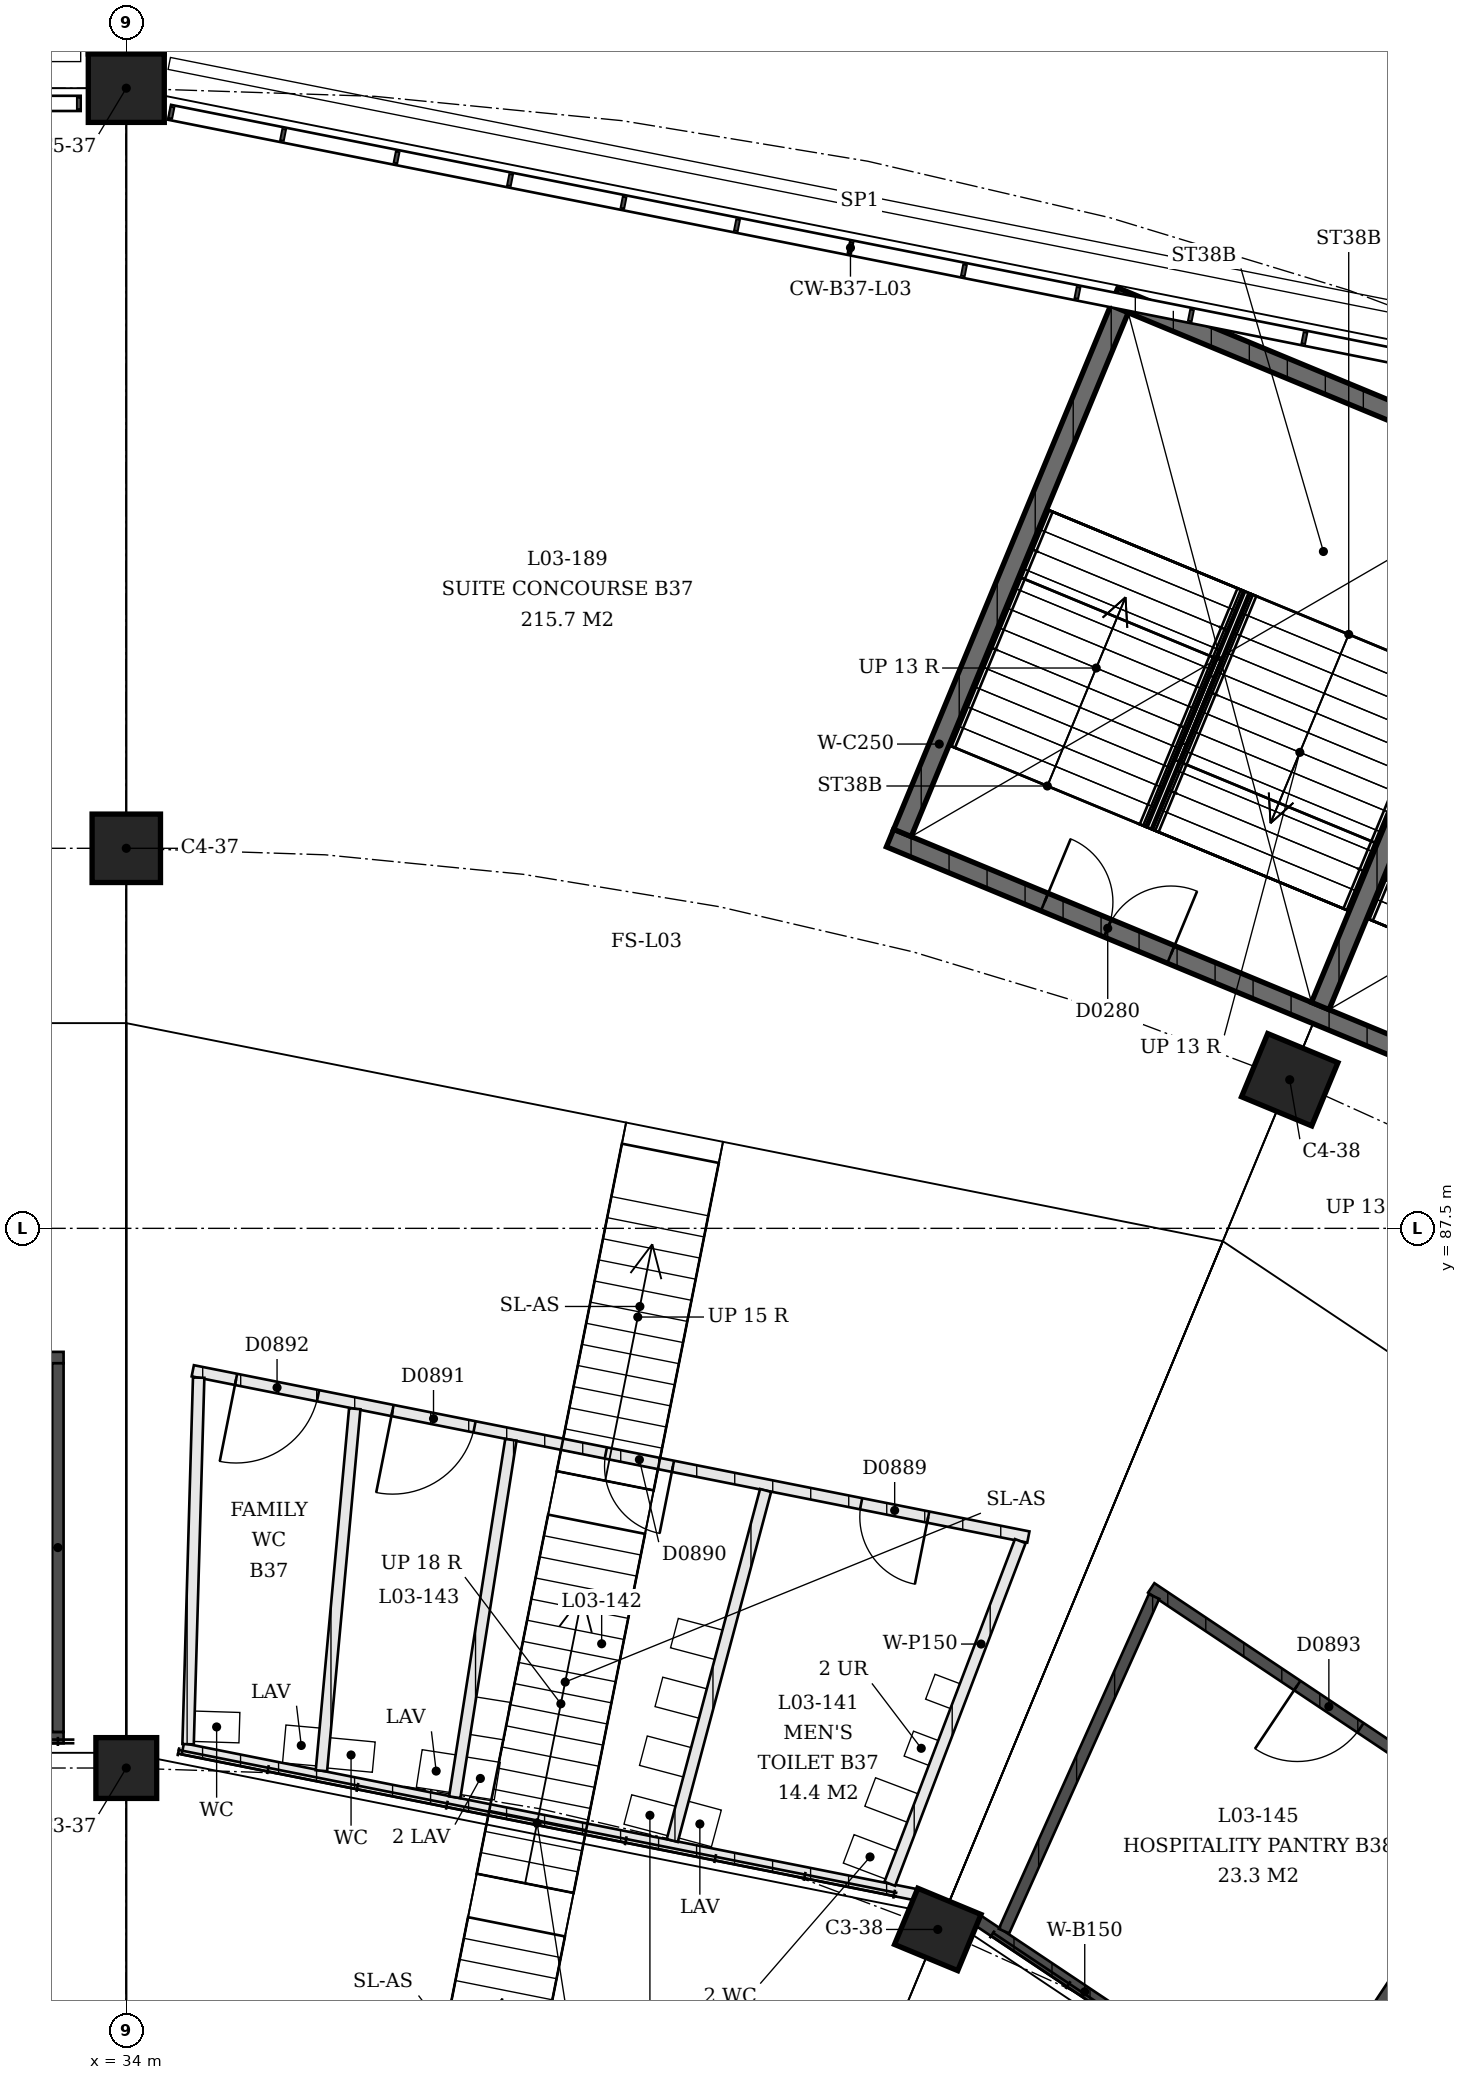
"""IFC4 building model, lengths in metres.
Left out: names, types, materials, properties, quantities, classifications, styles, units other than length and angle.
Written with IfcOpenShell. Run it as: python <this file> out.ifc"""

import sys

from ifc_helpers import new_model, si_unit, direction, frame, frame_2d, origin, origin_2d, place, context, subcontext, project, spatial, rectangle, extrude, element, fill, save


model = new_model("IFC4")
c1 = context("Model", 3, precision=1e-05, world=origin(), true_north=direction((0.0, 1.0)))
c2 = subcontext(c1, "Body", "Model", "MODEL_VIEW")
j1 = project(units=[si_unit("LENGTHUNIT", "METRE"), si_unit("PLANEANGLEUNIT", "RADIAN")], contexts=[c1])
p1 = place(None, origin())
s1 = spatial("IfcSite", under=j1, at=p1, CompositionType="ELEMENT")
p2 = place(p1, origin())
s2 = spatial("IfcBuilding", under=s1, at=p2, CompositionType="ELEMENT")
p3 = place(p2, frame((0.0, 0.0, 13.5)))
s3 = spatial("IfcBuildingStorey", under=s2, at=p3, CompositionType="ELEMENT", Elevation=13.5)
p4 = place(p3, frame((34.0, 80.4, 0.0), z_axis=(0.0, 0.0, 1.0), x_axis=(-1.0, 0.0, 0.0)))
e1 = element("IfcColumn", 1, at=p4, inside=s3, PredefinedType="COLUMN", context=c2, shape_type="SweptSolid", body=[
    extrude(rectangle(XDim=0.8, YDim=0.8, at=origin_2d()), origin(), (0.0, 0.0, 1.0), 2.033),
])
p5 = place(p3, frame((34.0, 92.5, 0.0), z_axis=(0.0, 0.0, 1.0), x_axis=(-1.0, 0.0, 0.0)))
e2 = element("IfcColumn", 2, at=p5, inside=s3, PredefinedType="COLUMN", context=c2, shape_type="SweptSolid", body=[
    extrude(rectangle(XDim=0.9, YDim=0.9, at=origin_2d()), origin(), (0.0, 0.0, 1.0), 4.5),
])
p6 = place(p3, frame((34.0, 102.5, 0.0), z_axis=(0.0, 0.0, 1.0), x_axis=(-1.0, 0.0, 0.0)))
e3 = element("IfcColumn", 3, at=p6, inside=s3, PredefinedType="COLUMN", context=c2, shape_type="SweptSolid", body=[
    extrude(rectangle(XDim=1.0, YDim=0.9, at=origin_2d()), origin(), (0.0, 0.0, 1.0), 4.5),
])
p7 = place(p3, frame((44.677, 78.276, 0.0), z_axis=(0.0, 0.0, 1.0), x_axis=(-0.923879532511, 0.382683432365, 0.0)))
e4 = element("IfcColumn", 4, at=p7, inside=s3, PredefinedType="COLUMN", context=c2, shape_type="SweptSolid", body=[
    extrude(rectangle(XDim=0.9, YDim=0.8, at=origin_2d()), origin(), (0.0, 0.0, 1.0), 2.033),
])
p8 = place(p3, frame((49.307, 89.455, 0.0), z_axis=(0.0, 0.0, 1.0), x_axis=(-0.923879532511, 0.382683432365, 0.0)))
e5 = element("IfcColumn", 5, at=p8, inside=s3, PredefinedType="COLUMN", context=c2, shape_type="SweptSolid", body=[
    extrude(rectangle(XDim=1.0, YDim=0.9, at=origin_2d()), origin(), (0.0, 0.0, 1.0), 4.5),
])
p9 = place(p3, frame((55.274, 87.985, 0.0), z_axis=(0.0, 0.0, 1.0), x_axis=(-0.923877480578, 0.382688386133, 0.0)))
e6 = element("IfcWall", 6, at=p9, inside=s3, PredefinedType="SHEAR", context=c2, shape_type="SweptSolid", body=[
    extrude(rectangle(XDim=12.15, YDim=0.25, at=frame_2d((6.075, 0.0))), origin(), (0.0, 0.0, 1.0), 4.09),
])
p10 = place(p9, frame((2.2, 0.0, 0.0)))
e7 = element("IfcOpeningElement", 7, at=p10, cuts=e6, PredefinedType="OPENING", context=c2, shape_type="SweptSolid", body=[
    extrude(rectangle(XDim=1.8, YDim=2.1, at=frame_2d((0.9, 1.05))), frame((0.0, 0.125, 0.0), z_axis=(0.0, -1.0, 0.0), x_axis=(1.0, 0.0, 0.0)), (0.0, 0.0, 1.0), 0.25),
])
p11 = place(p9, frame((8.15, 0.0, 0.0)))
e8 = element("IfcOpeningElement", 8, at=p11, cuts=e6, PredefinedType="OPENING", context=c2, shape_type="SweptSolid", body=[
    extrude(rectangle(XDim=1.8, YDim=2.1, at=frame_2d((0.9, 1.05))), frame((0.0, 0.125, 0.0), z_axis=(0.0, -1.0, 0.0), x_axis=(1.0, 0.0, 0.0)), (0.0, 0.0, 1.0), 0.25),
])
p12 = place(p3, frame((58.224, 95.108, 0.0), z_axis=(0.0, 0.0, 1.0), x_axis=(-0.923884584817, 0.382671234792, 0.0)))
e9 = element("IfcWall", 9, at=p12, inside=s3, PredefinedType="SHEAR", context=c2, shape_type="SweptSolid", body=[
    extrude(rectangle(XDim=12.15, YDim=0.25, at=frame_2d((6.075, 0.0))), origin(), (0.0, 0.0, 1.0), 4.09),
])
p13 = place(p3, frame((44.212, 92.702, 0.0), z_axis=(0.0, 0.0, 1.0), x_axis=(0.382664910245, 0.923887204407, 0.0)))
e10 = element("IfcWall", 10, at=p13, inside=s3, PredefinedType="SHEAR", context=c2, shape_type="SweptSolid", body=[
    extrude(rectangle(XDim=7.46, YDim=0.25, at=frame_2d((3.73, 0.0))), origin(), (0.0, 0.0, 1.0), 4.09),
])
p14 = place(p3, frame((49.709, 90.425, 0.0), z_axis=(0.0, 0.0, 1.0), x_axis=(0.382676480483, 0.923882412044, 0.0)))
e11 = element("IfcWall", 11, at=p14, inside=s3, PredefinedType="SHEAR", context=c2, shape_type="SweptSolid", body=[
    extrude(rectangle(XDim=7.46, YDim=0.25, at=frame_2d((3.73, 0.0))), origin(), (0.0, 0.0, 1.0), 4.09),
])
p15 = place(p3, frame((20.9, 80.8, 0.0), z_axis=(0.0, 0.0, 1.0), x_axis=(1.0, 0.0, 0.0)))
e12 = element("IfcWall", 12, at=p15, inside=s3, PredefinedType="SOLIDWALL", context=c2, shape_type="SweptSolid", body=[
    extrude(rectangle(XDim=12.275, YDim=0.15, at=frame_2d((6.138, 0.0))), origin(), (0.0, 0.0, 1.0), 3.0),
])
p16 = place(p3, frame((21.225, 85.8, 0.0), z_axis=(0.0, 0.0, 1.0), x_axis=(1.0, 0.0, 0.0)))
e13 = element("IfcWall", 13, at=p16, inside=s3, PredefinedType="SOLIDWALL", context=c2, shape_type="SweptSolid", body=[
    extrude(rectangle(XDim=11.95, YDim=0.15, at=frame_2d((5.975, 0.0))), origin(), (0.0, 0.0, 1.0), 3.0),
])
p17 = place(p16, frame((2.525, 0.0, 0.0)))
e14 = element("IfcOpeningElement", 14, at=p17, cuts=e13, PredefinedType="OPENING", context=c2, shape_type="SweptSolid", body=[
    extrude(rectangle(XDim=1.0, YDim=2.1, at=frame_2d((0.5, 1.05))), frame((0.0, 0.075, 0.0), z_axis=(0.0, -1.0, 0.0), x_axis=(1.0, 0.0, 0.0)), (0.0, 0.0, 1.0), 0.15),
])
p18 = place(p16, frame((8.425, 0.0, 0.0)))
e15 = element("IfcOpeningElement", 15, at=p18, cuts=e13, PredefinedType="OPENING", context=c2, shape_type="SweptSolid", body=[
    extrude(rectangle(XDim=1.0, YDim=2.1, at=frame_2d((0.5, 1.05))), frame((0.0, 0.075, 0.0), z_axis=(0.0, -1.0, 0.0), x_axis=(1.0, 0.0, 0.0)), (0.0, 0.0, 1.0), 0.15),
])
p19 = place(p3, frame((33.1, 80.875, 0.0), z_axis=(0.0, 0.0, 1.0), x_axis=(0.0, 1.0, 0.0)))
e16 = element("IfcWall", 16, at=p19, inside=s3, PredefinedType="SOLIDWALL", context=c2, shape_type="SweptSolid", body=[
    extrude(rectangle(XDim=4.85, YDim=0.15, at=frame_2d((2.425, 0.0))), origin(), (0.0, 0.0, 1.0), 3.0),
])
p20 = place(p3, frame((44.38, 78.735, 0.0), z_axis=(0.0, 0.0, 1.0), x_axis=(-0.980786564352, 0.19508386706, 0.0)))
e17 = element("IfcWall", 17, at=p20, inside=s3, PredefinedType="PARTITIONING", context=c2, shape_type="SweptSolid", body=[
    extrude(rectangle(XDim=9.825, YDim=0.15, at=frame_2d((4.913, 0.0))), origin(), (0.0, 0.0, 1.0), 3.0),
])
p21 = place(p3, frame((45.869, 83.439, 0.0), z_axis=(0.0, 0.0, 1.0), x_axis=(-0.980786208969, 0.195085653744, 0.0)))
e18 = element("IfcWall", 18, at=p21, inside=s3, PredefinedType="PARTITIONING", context=c2, shape_type="SweptSolid", body=[
    extrude(rectangle(XDim=11.209, YDim=0.15, at=frame_2d((5.604, 0.0))), origin(), (0.0, 0.0, 1.0), 3.0),
])
p22 = place(p21, frame((1.343, 0.0, 0.0)))
e19 = element("IfcOpeningElement", 19, at=p22, cuts=e18, PredefinedType="OPENING", context=c2, shape_type="SweptSolid", body=[
    extrude(rectangle(XDim=0.9, YDim=2.1, at=frame_2d((0.45, 1.05))), frame((0.0, 0.075, 0.0), z_axis=(0.0, -1.0, 0.0), x_axis=(1.0, 0.0, 0.0)), (0.0, 0.0, 1.0), 0.15),
])
p23 = place(p21, frame((4.768, 0.0, 0.0)))
e20 = element("IfcOpeningElement", 20, at=p23, cuts=e18, PredefinedType="OPENING", context=c2, shape_type="SweptSolid", body=[
    extrude(rectangle(XDim=0.9, YDim=2.1, at=frame_2d((0.45, 1.05))), frame((0.0, 0.075, 0.0), z_axis=(0.0, -1.0, 0.0), x_axis=(1.0, 0.0, 0.0)), (0.0, 0.0, 1.0), 0.15),
])
p24 = place(p21, frame((7.43, 0.0, 0.0)))
e21 = element("IfcOpeningElement", 21, at=p24, cuts=e18, PredefinedType="OPENING", context=c2, shape_type="SweptSolid", body=[
    extrude(rectangle(XDim=1.1, YDim=2.1, at=frame_2d((0.55, 1.05))), frame((0.0, 0.075, 0.0), z_axis=(0.0, -1.0, 0.0), x_axis=(1.0, 0.0, 0.0)), (0.0, 0.0, 1.0), 0.15),
])
p25 = place(p21, frame((9.529, 0.0, 0.0)))
e22 = element("IfcOpeningElement", 22, at=p25, cuts=e18, PredefinedType="OPENING", context=c2, shape_type="SweptSolid", body=[
    extrude(rectangle(XDim=1.1, YDim=2.1, at=frame_2d((0.55, 1.05))), frame((0.0, 0.075, 0.0), z_axis=(0.0, -1.0, 0.0), x_axis=(1.0, 0.0, 0.0)), (0.0, 0.0, 1.0), 0.15),
])
p26 = place(p3, frame((44.045, 78.877, 0.0), z_axis=(0.0, 0.0, 1.0), x_axis=(0.355921670207, 0.934515791561, 0.0)))
e23 = element("IfcWall", 23, at=p26, inside=s3, PredefinedType="PARTITIONING", context=c2, shape_type="SweptSolid", body=[
    extrude(rectangle(XDim=4.824, YDim=0.15, at=frame_2d((2.412, 0.0))), origin(), (0.0, 0.0, 1.0), 3.0),
])
p27 = place(p3, frame((41.183, 79.446, 0.0), z_axis=(0.0, 0.0, 1.0), x_axis=(0.257618021969, 0.966246839455, 0.0)))
e24 = element("IfcWall", 24, at=p27, inside=s3, PredefinedType="PARTITIONING", context=c2, shape_type="SweptSolid", body=[
    extrude(rectangle(XDim=4.767, YDim=0.15, at=frame_2d((2.383, 0.0))), origin(), (0.0, 0.0, 1.0), 3.0),
])
p28 = place(p3, frame((38.322, 80.015, 0.0), z_axis=(0.0, 0.0, 1.0), x_axis=(0.155127731688, 0.987894420908, 0.0)))
e25 = element("IfcWall", 25, at=p28, inside=s3, PredefinedType="PARTITIONING", context=c2, shape_type="SweptSolid", body=[
    extrude(rectangle(XDim=4.761, YDim=0.15, at=frame_2d((2.38, 0.0))), origin(), (0.0, 0.0, 1.0), 3.0),
])
p29 = place(p3, frame((36.567, 80.364, 0.0), z_axis=(0.0, 0.0, 1.0), x_axis=(0.091727705385, 0.995784127241, 0.0)))
e26 = element("IfcWall", 26, at=p29, inside=s3, PredefinedType="PARTITIONING", context=c2, shape_type="SweptSolid", body=[
    extrude(rectangle(XDim=4.783, YDim=0.15, at=frame_2d((2.392, 0.0))), origin(), (0.0, 0.0, 1.0), 3.0),
])
p30 = place(p3, frame((34.813, 80.713, 0.0), z_axis=(0.0, 0.0, 1.0), x_axis=(0.028793807365, 0.999585372371, 0.0)))
e27 = element("IfcWall", 27, at=p30, inside=s3, PredefinedType="PARTITIONING", context=c2, shape_type="SweptSolid", body=[
    extrude(rectangle(XDim=4.824, YDim=0.15, at=frame_2d((2.412, 0.0))), origin(), (0.0, 0.0, 1.0), 3.0),
])
p31 = place(p3, frame((45.211, 78.391, 0.0), z_axis=(0.0, 0.0, 1.0), x_axis=(0.831470078842, -0.555569534793, 0.0)))
e28 = element("IfcWall", 28, at=p31, inside=s3, PredefinedType="SOLIDWALL", context=c2, shape_type="SweptSolid", body=[
    extrude(rectangle(XDim=9.718, YDim=0.15, at=frame_2d((4.859, 0.0))), origin(), (0.0, 0.0, 1.0), 3.0),
])
p32 = place(p3, frame((47.485, 82.77, 0.0), z_axis=(0.0, 0.0, 1.0), x_axis=(0.831470287315, -0.555569222791, 0.0)))
e29 = element("IfcWall", 29, at=p32, inside=s3, PredefinedType="SOLIDWALL", context=c2, shape_type="SweptSolid", body=[
    extrude(rectangle(XDim=11.082, YDim=0.15, at=frame_2d((5.541, 0.0))), origin(), (0.0, 0.0, 1.0), 3.0),
])
p33 = place(p32, frame((2.311, 0.0, 0.0)))
e30 = element("IfcOpeningElement", 30, at=p33, cuts=e29, PredefinedType="OPENING", context=c2, shape_type="SweptSolid", body=[
    extrude(rectangle(XDim=1.0, YDim=2.1, at=frame_2d((0.5, 1.05))), frame((0.0, 0.075, 0.0), z_axis=(0.0, -1.0, 0.0), x_axis=(1.0, 0.0, 0.0)), (0.0, 0.0, 1.0), 0.15),
])
p34 = place(p32, frame((7.771, 0.0, 0.0)))
e31 = element("IfcOpeningElement", 31, at=p34, cuts=e29, PredefinedType="OPENING", context=c2, shape_type="SweptSolid", body=[
    extrude(rectangle(XDim=1.0, YDim=2.1, at=frame_2d((0.5, 1.05))), frame((0.0, 0.075, 0.0), z_axis=(0.0, -1.0, 0.0), x_axis=(1.0, 0.0, 0.0)), (0.0, 0.0, 1.0), 0.15),
])
p35 = place(p3, frame((45.548, 78.254, 0.0), z_axis=(0.0, 0.0, 1.0), x_axis=(0.409145990025, 0.912468935825, 0.0)))
e32 = element("IfcWall", 32, at=p35, inside=s3, PredefinedType="SOLIDWALL", context=c2, shape_type="SweptSolid", body=[
    extrude(rectangle(XDim=4.824, YDim=0.15, at=frame_2d((2.412, 0.0))), origin(), (0.0, 0.0, 1.0), 3.0),
])
p36 = place(p3, frame((49.417, 75.67, 0.0), z_axis=(0.0, 0.0, 1.0), x_axis=(0.553989356348, 0.832523749243, 0.0)))
e33 = element("IfcWall", 33, at=p36, inside=s3, PredefinedType="SOLIDWALL", context=c2, shape_type="SweptSolid", body=[
    extrude(rectangle(XDim=4.757, YDim=0.15, at=frame_2d((2.378, 0.0))), origin(), (0.0, 0.0, 1.0), 3.0),
])
p37 = place(p11, origin())
e34 = element("IfcDoor", 34, at=p37, inside=s3, OperationType="DOUBLE_DOOR_SINGLE_SWING", PredefinedType="DOOR", context=c2, shape_type="SweptSolid", body=[
    extrude(rectangle(XDim=1.8, YDim=2.1, at=frame_2d((0.9, 1.05))), frame((0.0, 0.025, 0.0), z_axis=(0.0, -1.0, 0.0), x_axis=(1.0, 0.0, 0.0)), (0.0, 0.0, 1.0), 0.05),
])
fill(e8, e34)
p38 = place(p22, origin())
e35 = element("IfcDoor", 35, at=p38, inside=s3, OperationType="SINGLE_SWING_RIGHT", PredefinedType="DOOR", context=c2, shape_type="SweptSolid", body=[
    extrude(rectangle(XDim=0.9, YDim=2.1, at=frame_2d((0.45, 1.05))), frame((0.0, 0.025, 0.0), z_axis=(0.0, -1.0, 0.0), x_axis=(1.0, 0.0, 0.0)), (0.0, 0.0, 1.0), 0.05),
])
fill(e19, e35)
p39 = place(p23, origin())
e36 = element("IfcDoor", 36, at=p39, inside=s3, OperationType="SINGLE_SWING_RIGHT", PredefinedType="DOOR", context=c2, shape_type="SweptSolid", body=[
    extrude(rectangle(XDim=0.9, YDim=2.1, at=frame_2d((0.45, 1.05))), frame((0.0, 0.025, 0.0), z_axis=(0.0, -1.0, 0.0), x_axis=(1.0, 0.0, 0.0)), (0.0, 0.0, 1.0), 0.05),
])
fill(e20, e36)
p40 = place(p24, origin())
e37 = element("IfcDoor", 37, at=p40, inside=s3, OperationType="SINGLE_SWING_LEFT", PredefinedType="DOOR", context=c2, shape_type="SweptSolid", body=[
    extrude(rectangle(XDim=1.1, YDim=2.1, at=frame_2d((0.55, 1.05))), frame((0.0, 0.025, 0.0), z_axis=(0.0, -1.0, 0.0), x_axis=(1.0, 0.0, 0.0)), (0.0, 0.0, 1.0), 0.05),
])
fill(e21, e37)
p41 = place(p25, origin())
e38 = element("IfcDoor", 38, at=p41, inside=s3, OperationType="SINGLE_SWING_LEFT", PredefinedType="DOOR", context=c2, shape_type="SweptSolid", body=[
    extrude(rectangle(XDim=1.1, YDim=2.1, at=frame_2d((0.55, 1.05))), frame((0.0, 0.025, 0.0), z_axis=(0.0, -1.0, 0.0), x_axis=(1.0, 0.0, 0.0)), (0.0, 0.0, 1.0), 0.05),
])
fill(e22, e38)
p42 = place(p33, origin())
e39 = element("IfcDoor", 39, at=p42, inside=s3, OperationType="SINGLE_SWING_LEFT", PredefinedType="DOOR", context=c2, shape_type="SweptSolid", body=[
    extrude(rectangle(XDim=1.0, YDim=2.1, at=frame_2d((0.5, 1.05))), frame((0.0, 0.025, 0.0), z_axis=(0.0, -1.0, 0.0), x_axis=(1.0, 0.0, 0.0)), (0.0, 0.0, 1.0), 0.05),
])
fill(e30, e39)
save(model, sys.argv[1])
